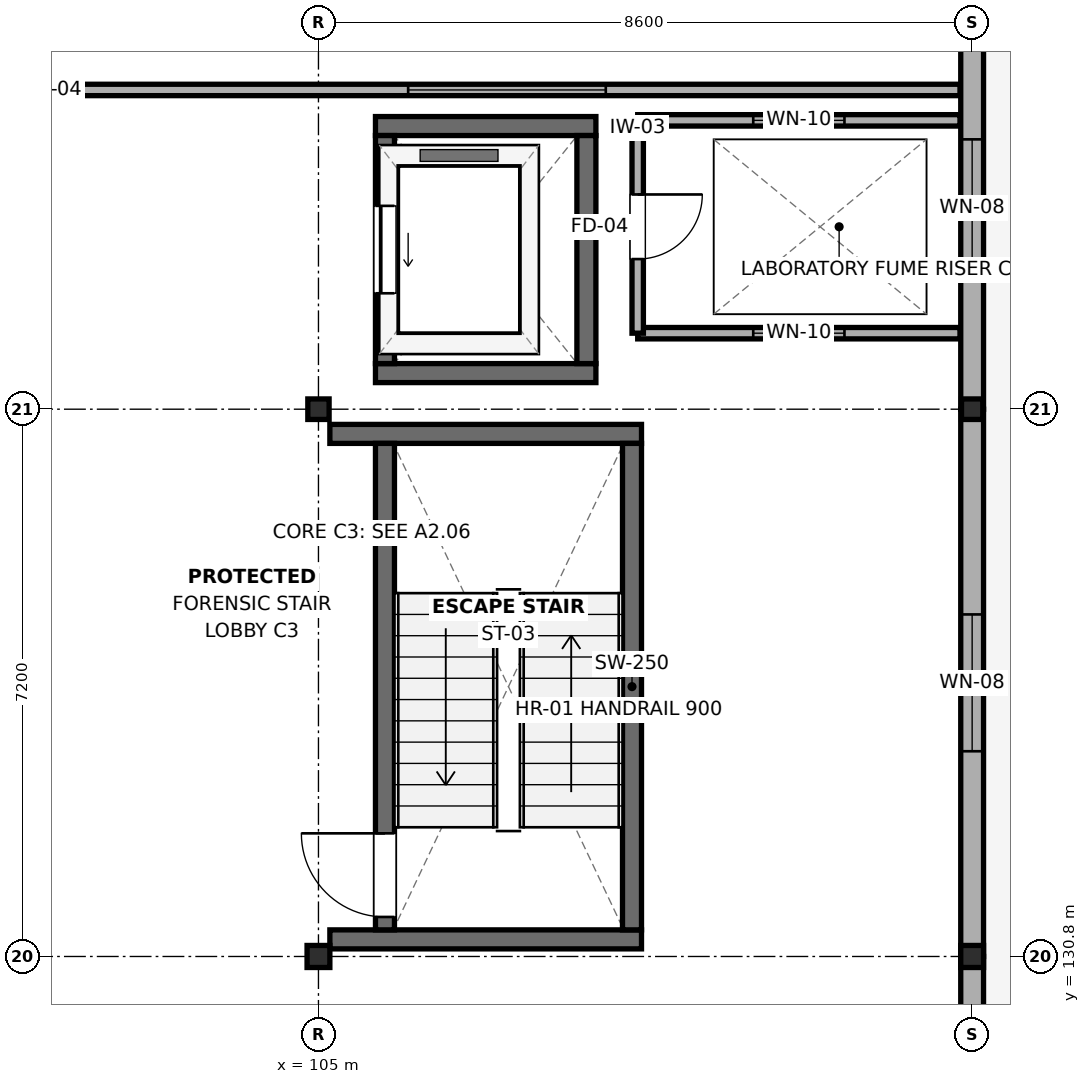
"""IFC4 building model, lengths in metres.
Left out: names, types, materials, properties, quantities, classifications, styles, units other than length and angle.
Written with IfcOpenShell. Run it as: python <this file> out.ifc"""

import sys

from ifc_helpers import new_model, si_unit, direction, frame, frame_2d, origin, origin_2d, place, context, subcontext, project, spatial, rectangle, i_section, extrude, element, fill, save


model = new_model("IFC4")
c1 = context("Model", 3, precision=1e-05, world=origin(), true_north=direction((0.0, 1.0)))
c2 = subcontext(c1, "Body", "Model", "MODEL_VIEW")
j1 = project(units=[si_unit("LENGTHUNIT", "METRE"), si_unit("PLANEANGLEUNIT", "RADIAN")], contexts=[c1])
p1 = place(None, origin())
s1 = spatial("IfcSite", under=j1, at=p1, CompositionType="ELEMENT")
p2 = place(p1, origin())
s2 = spatial("IfcBuilding", under=s1, at=p2, CompositionType="ELEMENT")
p3 = place(p2, frame((0.0, 0.0, 21.0)))
s3 = spatial("IfcBuildingStorey", under=s2, at=p3, CompositionType="ELEMENT", Elevation=21.0)
p4 = place(p3, frame((105.0, 130.8, 0.0), z_axis=(0.0, 0.0, 1.0), x_axis=(1.0, 0.0, 0.0)))
e1 = element("IfcColumn", 1, at=p4, inside=s3, PredefinedType="COLUMN", context=c2, shape_type="SweptSolid", body=[
    extrude(i_section(OverallWidth=0.3, OverallDepth=0.29, WebThickness=0.009, FlangeThickness=0.014, FilletRadius=0.027, at=origin_2d()), origin(), (0.0, 0.0, 1.0), 3.7),
])
p5 = place(p3, frame((105.0, 138.0, 0.0), z_axis=(0.0, 0.0, 1.0), x_axis=(1.0, 0.0, 0.0)))
e2 = element("IfcColumn", 2, at=p5, inside=s3, PredefinedType="COLUMN", context=c2, shape_type="SweptSolid", body=[
    extrude(i_section(OverallWidth=0.28, OverallDepth=0.27, WebThickness=0.008, FlangeThickness=0.013, FilletRadius=0.024, at=origin_2d()), origin(), (0.0, 0.0, 1.0), 3.7),
])
p6 = place(p3, frame((113.6, 130.8, 0.0), z_axis=(0.0, 0.0, 1.0), x_axis=(1.0, 0.0, 0.0)))
e3 = element("IfcColumn", 3, at=p6, inside=s3, PredefinedType="COLUMN", context=c2, shape_type="SweptSolid", body=[
    extrude(i_section(OverallWidth=0.3, OverallDepth=0.29, WebThickness=0.009, FlangeThickness=0.014, FilletRadius=0.027, at=origin_2d()), origin(), (0.0, 0.0, 1.0), 3.7),
])
p7 = place(p3, frame((113.6, 138.0, 0.0), z_axis=(0.0, 0.0, 1.0), x_axis=(1.0, 0.0, 0.0)))
e4 = element("IfcColumn", 4, at=p7, inside=s3, PredefinedType="COLUMN", context=c2, shape_type="SweptSolid", body=[
    extrude(i_section(OverallWidth=0.28, OverallDepth=0.27, WebThickness=0.008, FlangeThickness=0.013, FilletRadius=0.024, at=origin_2d()), origin(), (0.0, 0.0, 1.0), 3.7),
])
for number, where, z_axis, x_axis in (
    (5, (105.15, 131.025, 0.0), (0.0, 0.0, 1.0), (1.0, 0.0, 0.0)),
    (6, (105.15, 137.675, 0.0), (0.0, 0.0, 1.0), (1.0, 0.0, 0.0)),
):
    element("IfcWall", number, at=place(p3, frame(where, z_axis=z_axis, x_axis=x_axis)), inside=s3, PredefinedType="SHEAR", context=c2, shape_type="SweptSolid", body=[
        extrude(rectangle(XDim=4.1, YDim=0.25, at=frame_2d((2.05, 0.0))), origin(), (0.0, 0.0, 1.0), 3.7),
    ])
p8 = place(p3, frame((105.875, 131.15, 0.0), z_axis=(0.0, 0.0, 1.0), x_axis=(0.0, 1.0, 0.0)))
e7 = element("IfcWall", 7, at=p8, inside=s3, PredefinedType="SHEAR", context=c2, shape_type="SweptSolid", body=[
    extrude(rectangle(XDim=6.4, YDim=0.25, at=frame_2d((3.2, 0.0))), origin(), (0.0, 0.0, 1.0), 3.7),
])
p9 = place(p8, frame((0.17, 0.0, 0.0)))
e8 = element("IfcOpeningElement", 8, at=p9, cuts=e7, PredefinedType="OPENING", context=c2, shape_type="SweptSolid", body=[
    extrude(rectangle(XDim=1.1, YDim=2.15, at=frame_2d((0.55, 1.075))), frame((0.0, 0.14, 0.0), z_axis=(0.0, -1.0, 0.0), x_axis=(1.0, 0.0, 0.0)), (0.0, 0.0, 1.0), 0.28),
])
p10 = place(p3, frame((109.125, 131.15, 0.0), z_axis=(0.0, 0.0, 1.0), x_axis=(0.0, 1.0, 0.0)))
e9 = element("IfcWall", 9, at=p10, inside=s3, PredefinedType="SHEAR", context=c2, shape_type="SweptSolid", body=[
    extrude(rectangle(XDim=6.4, YDim=0.25, at=frame_2d((3.2, 0.0))), origin(), (0.0, 0.0, 1.0), 3.7),
])
for number, where, z_axis, x_axis in (
    (10, (105.75, 138.475, 0.0), (0.0, 0.0, 1.0), (1.0, 0.0, 0.0)),
    (11, (105.75, 141.725, 0.0), (0.0, 0.0, 1.0), (1.0, 0.0, 0.0)),
):
    element("IfcWall", number, at=place(p3, frame(where, z_axis=z_axis, x_axis=x_axis)), inside=s3, PredefinedType="SHEAR", context=c2, shape_type="SweptSolid", body=[
        extrude(rectangle(XDim=2.9, YDim=0.25, at=frame_2d((1.45, 0.0))), origin(), (0.0, 0.0, 1.0), 3.7),
    ])
p11 = place(p3, frame((105.875, 138.6, 0.0), z_axis=(0.0, 0.0, 1.0), x_axis=(0.0, 1.0, 0.0)))
e12 = element("IfcWall", 12, at=p11, inside=s3, PredefinedType="SHEAR", context=c2, shape_type="SweptSolid", body=[
    extrude(rectangle(XDim=3.0, YDim=0.25, at=frame_2d((1.5, 0.0))), origin(), (0.0, 0.0, 1.0), 3.7),
])
p12 = place(p11, frame((0.925, 0.0, 0.0)))
e13 = element("IfcOpeningElement", 13, at=p12, cuts=e12, PredefinedType="OPENING", context=c2, shape_type="SweptSolid", body=[
    extrude(rectangle(XDim=1.15, YDim=2.15, at=frame_2d((0.575, 1.075))), frame((0.0, 0.14, 0.0), z_axis=(0.0, -1.0, 0.0), x_axis=(1.0, 0.0, 0.0)), (0.0, 0.0, 1.0), 0.28),
])
p13 = place(p3, frame((108.525, 138.6, 0.0), z_axis=(0.0, 0.0, 1.0), x_axis=(0.0, 1.0, 0.0)))
e14 = element("IfcWall", 14, at=p13, inside=s3, PredefinedType="SHEAR", context=c2, shape_type="SweptSolid", body=[
    extrude(rectangle(XDim=3.0, YDim=0.25, at=frame_2d((1.5, 0.0))), origin(), (0.0, 0.0, 1.0), 3.7),
])
p14 = place(p3, frame((113.6, 122.25, 0.0), z_axis=(0.0, 0.0, 1.0), x_axis=(0.0, 1.0, 0.0)))
e15 = element("IfcWall", 15, at=p14, inside=s3, PredefinedType="SOLIDWALL", context=c2, shape_type="SweptSolid", body=[
    extrude(rectangle(XDim=8.55, YDim=0.3, at=frame_2d((4.275, 0.0))), origin(), (0.0, 0.0, 1.0), 3.195),
])
p15 = place(p14, frame((1.394, 0.0, 0.65)))
e16 = element("IfcOpeningElement", 16, at=p15, cuts=e15, PredefinedType="OPENING", context=c2, shape_type="SweptSolid", body=[
    extrude(rectangle(XDim=2.0, YDim=1.8, at=frame_2d((1.0, 0.9))), frame((0.0, 0.165, 0.0), z_axis=(0.0, -1.0, 0.0), x_axis=(1.0, 0.0, 0.0)), (0.0, 0.0, 1.0), 0.33),
])
p16 = place(p14, frame((5.156, 0.0, 0.65)))
e17 = element("IfcOpeningElement", 17, at=p16, cuts=e15, PredefinedType="OPENING", context=c2, shape_type="SweptSolid", body=[
    extrude(rectangle(XDim=2.0, YDim=1.8, at=frame_2d((1.0, 0.9))), frame((0.0, 0.165, 0.0), z_axis=(0.0, -1.0, 0.0), x_axis=(1.0, 0.0, 0.0)), (0.0, 0.0, 1.0), 0.33),
])
p17 = place(p3, frame((113.6, 130.8, 0.0), z_axis=(0.0, 0.0, 1.0), x_axis=(0.0, 1.0, 0.0)))
e18 = element("IfcWall", 18, at=p17, inside=s3, PredefinedType="SOLIDWALL", context=c2, shape_type="SweptSolid", body=[
    extrude(rectangle(XDim=7.2, YDim=0.3, at=frame_2d((3.6, 0.0))), origin(), (0.0, 0.0, 1.0), 3.195),
])
p18 = place(p17, frame((2.7, 0.0, 0.65)))
e19 = element("IfcOpeningElement", 19, at=p18, cuts=e18, PredefinedType="OPENING", context=c2, shape_type="SweptSolid", body=[
    extrude(rectangle(XDim=1.8, YDim=1.2, at=frame_2d((0.9, 0.6))), frame((0.0, 0.165, 0.0), z_axis=(0.0, -1.0, 0.0), x_axis=(1.0, 0.0, 0.0)), (0.0, 0.0, 1.0), 0.33),
])
p19 = place(p3, frame((113.6, 138.0, 0.0), z_axis=(0.0, 0.0, 1.0), x_axis=(0.0, 1.0, 0.0)))
e20 = element("IfcWall", 20, at=p19, inside=s3, PredefinedType="SOLIDWALL", context=c2, shape_type="SweptSolid", body=[
    extrude(rectangle(XDim=7.2, YDim=0.3, at=frame_2d((3.6, 0.0))), origin(), (0.0, 0.0, 1.0), 3.195),
])
p20 = place(p19, frame((1.75, 0.0, 0.65)))
e21 = element("IfcOpeningElement", 21, at=p20, cuts=e20, PredefinedType="OPENING", context=c2, shape_type="SweptSolid", body=[
    extrude(rectangle(XDim=1.8, YDim=1.2, at=frame_2d((0.9, 0.6))), frame((0.0, 0.165, 0.0), z_axis=(0.0, -1.0, 0.0), x_axis=(1.0, 0.0, 0.0)), (0.0, 0.0, 1.0), 0.33),
])
p21 = place(p3, frame((109.2, 139.0, 0.0), z_axis=(0.0, 0.0, 1.0), x_axis=(1.0, 0.0, 0.0)))
e22 = element("IfcWall", 22, at=p21, inside=s3, PredefinedType="PARTITIONING", context=c2, shape_type="SweptSolid", body=[
    extrude(rectangle(XDim=4.24, YDim=0.15, at=frame_2d((2.12, 0.0))), origin(), (0.0, 0.0, 1.0), 3.245),
])
p22 = place(p21, frame((1.52, 0.0, 0.95)))
e23 = element("IfcOpeningElement", 23, at=p22, cuts=e22, PredefinedType="OPENING", context=c2, shape_type="SweptSolid", body=[
    extrude(rectangle(XDim=1.2, YDim=1.5, at=frame_2d((0.6, 0.75))), frame((0.0, 0.09, 0.0), z_axis=(0.0, -1.0, 0.0), x_axis=(1.0, 0.0, 0.0)), (0.0, 0.0, 1.0), 0.18),
])
p23 = place(p3, frame((109.2, 141.8, 0.0), z_axis=(0.0, 0.0, 1.0), x_axis=(1.0, 0.0, 0.0)))
e24 = element("IfcWall", 24, at=p23, inside=s3, PredefinedType="PARTITIONING", context=c2, shape_type="SweptSolid", body=[
    extrude(rectangle(XDim=4.24, YDim=0.15, at=frame_2d((2.12, 0.0))), origin(), (0.0, 0.0, 1.0), 3.245),
])
p24 = place(p23, frame((1.52, 0.0, 0.95)))
e25 = element("IfcOpeningElement", 25, at=p24, cuts=e24, PredefinedType="OPENING", context=c2, shape_type="SweptSolid", body=[
    extrude(rectangle(XDim=1.2, YDim=1.5, at=frame_2d((0.6, 0.75))), frame((0.0, 0.09, 0.0), z_axis=(0.0, -1.0, 0.0), x_axis=(1.0, 0.0, 0.0)), (0.0, 0.0, 1.0), 0.18),
])
p25 = place(p3, frame((109.2, 139.0, 0.0), z_axis=(0.0, 0.0, 1.0), x_axis=(0.0, 1.0, 0.0)))
e26 = element("IfcWall", 26, at=p25, inside=s3, PredefinedType="PARTITIONING", context=c2, shape_type="SweptSolid", body=[
    extrude(rectangle(XDim=2.8, YDim=0.15, at=frame_2d((1.4, 0.0))), origin(), (0.0, 0.0, 1.0), 3.695),
])
p26 = place(p25, frame((0.975, 0.0, 0.0)))
e27 = element("IfcOpeningElement", 27, at=p26, cuts=e26, PredefinedType="OPENING", context=c2, shape_type="SweptSolid", body=[
    extrude(rectangle(XDim=0.85, YDim=2.1, at=frame_2d((0.425, 1.05))), frame((0.0, 0.09, 0.0), z_axis=(0.0, -1.0, 0.0), x_axis=(1.0, 0.0, 0.0)), (0.0, 0.0, 1.0), 0.18),
])
p27 = place(p3, frame((89.6, 142.2, 0.0), z_axis=(0.0, 0.0, 1.0), x_axis=(1.0, 0.0, 0.0)))
e28 = element("IfcWall", 28, at=p27, inside=s3, PredefinedType="PARTITIONING", context=c2, shape_type="SweptSolid", body=[
    extrude(rectangle(XDim=23.84, YDim=0.15, at=frame_2d((11.92, 0.0))), origin(), (0.0, 0.0, 1.0), 3.245),
])
p28 = place(p27, frame((4.66, 0.0, 0.95)))
e29 = element("IfcOpeningElement", 29, at=p28, cuts=e28, PredefinedType="OPENING", context=c2, shape_type="SweptSolid", body=[
    extrude(rectangle(XDim=2.6, YDim=1.5, at=frame_2d((1.3, 0.75))), frame((0.0, 0.09, 0.0), z_axis=(0.0, -1.0, 0.0), x_axis=(1.0, 0.0, 0.0)), (0.0, 0.0, 1.0), 0.18),
])
p29 = place(p27, frame((16.58, 0.0, 0.95)))
e30 = element("IfcOpeningElement", 30, at=p29, cuts=e28, PredefinedType="OPENING", context=c2, shape_type="SweptSolid", body=[
    extrude(rectangle(XDim=2.6, YDim=1.5, at=frame_2d((1.3, 0.75))), frame((0.0, 0.09, 0.0), z_axis=(0.0, -1.0, 0.0), x_axis=(1.0, 0.0, 0.0)), (0.0, 0.0, 1.0), 0.18),
])
p30 = place(p18, origin())
e31 = element("IfcWindow", 31, at=p30, inside=s3, PartitioningType="SINGLE_PANEL", PredefinedType="WINDOW", context=c2, shape_type="SweptSolid", body=[
    extrude(rectangle(XDim=1.8, YDim=1.2, at=frame_2d((0.9, 0.6))), frame((0.0, 0.03, 0.0), z_axis=(0.0, -1.0, 0.0), x_axis=(1.0, 0.0, 0.0)), (0.0, 0.0, 1.0), 0.06),
])
fill(e19, e31)
p31 = place(p20, origin())
e32 = element("IfcWindow", 32, at=p31, inside=s3, PartitioningType="SINGLE_PANEL", PredefinedType="WINDOW", context=c2, shape_type="SweptSolid", body=[
    extrude(rectangle(XDim=1.8, YDim=1.2, at=frame_2d((0.9, 0.6))), frame((0.0, 0.03, 0.0), z_axis=(0.0, -1.0, 0.0), x_axis=(1.0, 0.0, 0.0)), (0.0, 0.0, 1.0), 0.06),
])
fill(e21, e32)
p32 = place(p9, origin())
e33 = element("IfcDoor", 33, at=p32, inside=s3, OperationType="SINGLE_SWING_RIGHT", PredefinedType="DOOR", context=c2, shape_type="SweptSolid", body=[
    extrude(rectangle(XDim=1.1, YDim=2.15, at=frame_2d((0.55, 1.075))), frame((0.0, 0.025, 0.0), z_axis=(0.0, -1.0, 0.0), x_axis=(1.0, 0.0, 0.0)), (0.0, 0.0, 1.0), 0.05),
])
fill(e8, e33)
p33 = place(p12, origin())
e34 = element("IfcDoor", 34, at=p33, inside=s3, OperationType="SLIDING_TO_LEFT", PredefinedType="DOOR", context=c2, shape_type="SweptSolid", body=[
    extrude(rectangle(XDim=1.15, YDim=2.15, at=frame_2d((0.575, 1.075))), frame((0.0, 0.025, 0.0), z_axis=(0.0, -1.0, 0.0), x_axis=(1.0, 0.0, 0.0)), (0.0, 0.0, 1.0), 0.05),
])
fill(e13, e34)
p34 = place(p22, origin())
e35 = element("IfcWindow", 35, at=p34, inside=s3, PartitioningType="SINGLE_PANEL", PredefinedType="WINDOW", context=c2, shape_type="SweptSolid", body=[
    extrude(rectangle(XDim=1.2, YDim=1.5, at=frame_2d((0.6, 0.75))), frame((0.0, 0.03, 0.0), z_axis=(0.0, -1.0, 0.0), x_axis=(1.0, 0.0, 0.0)), (0.0, 0.0, 1.0), 0.06),
])
fill(e23, e35)
p35 = place(p24, origin())
e36 = element("IfcWindow", 36, at=p35, inside=s3, PartitioningType="SINGLE_PANEL", PredefinedType="WINDOW", context=c2, shape_type="SweptSolid", body=[
    extrude(rectangle(XDim=1.2, YDim=1.5, at=frame_2d((0.6, 0.75))), frame((0.0, 0.03, 0.0), z_axis=(0.0, -1.0, 0.0), x_axis=(1.0, 0.0, 0.0)), (0.0, 0.0, 1.0), 0.06),
])
fill(e25, e36)
p36 = place(p26, frame((0.85, 0.0, 0.0), z_axis=(0.0, 0.0, 1.0), x_axis=(-1.0, 0.0, 0.0)))
e37 = element("IfcDoor", 37, at=p36, inside=s3, OperationType="SINGLE_SWING_LEFT", PredefinedType="DOOR", context=c2, shape_type="SweptSolid", body=[
    extrude(rectangle(XDim=0.85, YDim=2.1, at=frame_2d((0.425, 1.05))), frame((0.0, 0.025, 0.0), z_axis=(0.0, -1.0, 0.0), x_axis=(1.0, 0.0, 0.0)), (0.0, 0.0, 1.0), 0.05),
])
fill(e27, e37)
p37 = place(p29, origin())
e38 = element("IfcWindow", 38, at=p37, inside=s3, PartitioningType="SINGLE_PANEL", PredefinedType="WINDOW", context=c2, shape_type="SweptSolid", body=[
    extrude(rectangle(XDim=2.6, YDim=1.5, at=frame_2d((1.3, 0.75))), frame((0.0, 0.03, 0.0), z_axis=(0.0, -1.0, 0.0), x_axis=(1.0, 0.0, 0.0)), (0.0, 0.0, 1.0), 0.06),
])
fill(e30, e38)
save(model, sys.argv[1])
